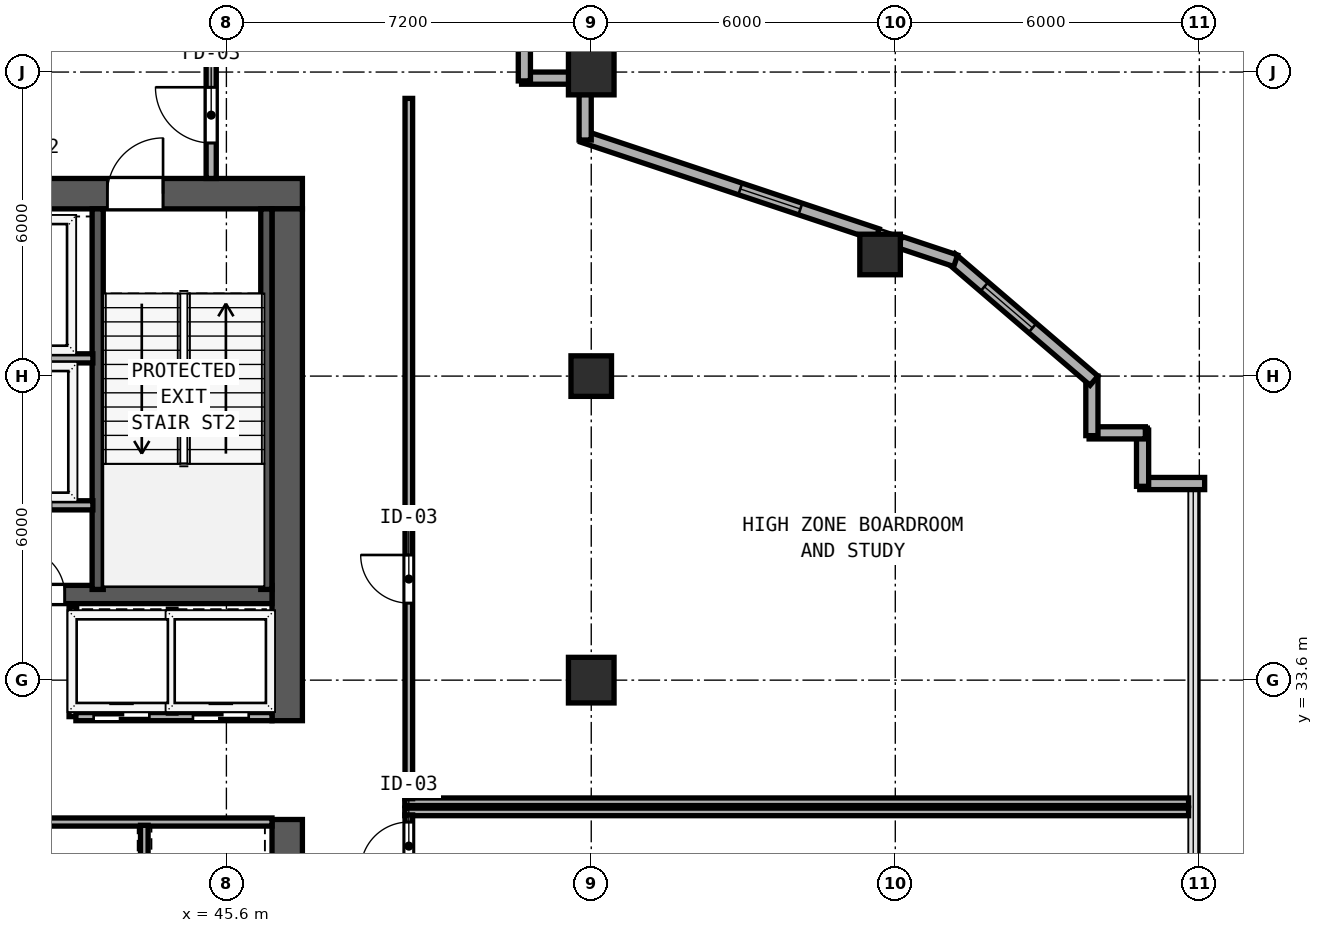
"""IFC4 building model, lengths in metres.
Left out: names, types, materials, properties, quantities, classifications, styles, units other than length and angle.
Written with IfcOpenShell. Run it as: python <this file> out.ifc"""

import sys

from ifc_helpers import new_model, si_unit, direction, frame, frame_2d, origin, origin_2d, place, context, subcontext, project, spatial, rectangle, hollow_rectangle, extrude, element, fill, save


model = new_model("IFC4")
c1 = context("Model", 3, precision=1e-05, world=origin(), true_north=direction((0.0, 1.0)))
c2 = subcontext(c1, "Body", "Model", "MODEL_VIEW")
j1 = project(units=[si_unit("LENGTHUNIT", "METRE"), si_unit("PLANEANGLEUNIT", "RADIAN")], contexts=[c1])
p1 = place(None, origin())
s1 = spatial("IfcSite", under=j1, at=p1, CompositionType="ELEMENT")
p2 = place(p1, origin())
s2 = spatial("IfcBuilding", under=s1, at=p2, CompositionType="ELEMENT")
p3 = place(p2, frame((0.0, 0.0, 164.6)))
s3 = spatial("IfcBuildingStorey", under=s2, at=p3, CompositionType="ELEMENT", Elevation=164.6)
p4 = place(p3, frame((29.7, 43.2, 0.0), z_axis=(0.0, 0.0, 1.0), x_axis=(1.0, 0.0, 0.0)))
e1 = element("IfcWall", 1, at=p4, inside=s3, PredefinedType="SHEAR", context=c2, shape_type="SweptSolid", body=[
    extrude(rectangle(XDim=17.4, YDim=0.6, at=frame_2d((8.7, 0.0))), origin(), (0.0, 0.0, 1.0), 4.22),
])
p5 = place(p4, frame((2.35, 0.0, 0.0)))
e2 = element("IfcOpeningElement", 2, at=p5, cuts=e1, PredefinedType="OPENING", context=c2, shape_type="SweptSolid", body=[
    extrude(rectangle(XDim=1.1, YDim=2.15, at=frame_2d((0.55, 1.075))), frame((0.0, 0.31, 0.0), z_axis=(0.0, -1.0, 0.0), x_axis=(1.0, 0.0, 0.0)), (0.0, 0.0, 1.0), 0.62),
])
p6 = place(p4, frame((7.46, 0.0, 0.0)))
e3 = element("IfcOpeningElement", 3, at=p6, cuts=e1, PredefinedType="OPENING", context=c2, shape_type="SweptSolid", body=[
    extrude(rectangle(XDim=1.1, YDim=2.15, at=frame_2d((0.55, 1.075))), frame((0.0, 0.31, 0.0), z_axis=(0.0, -1.0, 0.0), x_axis=(1.0, 0.0, 0.0)), (0.0, 0.0, 1.0), 0.62),
])
p7 = place(p4, frame((13.55, 0.0, 0.0)))
e4 = element("IfcOpeningElement", 4, at=p7, cuts=e1, PredefinedType="OPENING", context=c2, shape_type="SweptSolid", body=[
    extrude(rectangle(XDim=1.1, YDim=2.15, at=frame_2d((0.55, 1.075))), frame((0.0, 0.31, 0.0), z_axis=(0.0, -1.0, 0.0), x_axis=(1.0, 0.0, 0.0)), (0.0, 0.0, 1.0), 0.62),
])
p8 = place(p4, frame((4.68, 0.0, 0.0)))
e5 = element("IfcOpeningElement", 5, at=p8, cuts=e1, PredefinedType="OPENING", context=c2, shape_type="SweptSolid", body=[
    extrude(rectangle(XDim=1.1, YDim=2.2, at=frame_2d((0.55, 1.1))), frame((0.0, 0.31, 0.0), z_axis=(0.0, -1.0, 0.0), x_axis=(1.0, 0.0, 0.0)), (0.0, 0.0, 1.0), 0.62),
])
p9 = place(p4, frame((11.04, 0.0, 0.0)))
e6 = element("IfcOpeningElement", 6, at=p9, cuts=e1, PredefinedType="OPENING", context=c2, shape_type="SweptSolid", body=[
    extrude(rectangle(XDim=1.1, YDim=2.2, at=frame_2d((0.55, 1.1))), frame((0.0, 0.31, 0.0), z_axis=(0.0, -1.0, 0.0), x_axis=(1.0, 0.0, 0.0)), (0.0, 0.0, 1.0), 0.62),
])
p10 = place(p3, frame((46.8, 26.7, 0.0), z_axis=(0.0, 0.0, 1.0), x_axis=(0.0, 1.0, 0.0)))
e7 = element("IfcWall", 7, at=p10, inside=s3, PredefinedType="SHEAR", context=c2, shape_type="SweptSolid", body=[
    extrude(rectangle(XDim=4.15, YDim=0.6, at=frame_2d((2.075, 0.0))), origin(), (0.0, 0.0, 1.0), 4.22),
])
p11 = place(p3, frame((46.8, 32.8, 0.0), z_axis=(0.0, 0.0, 1.0), x_axis=(0.0, 1.0, 0.0)))
e8 = element("IfcWall", 8, at=p11, inside=s3, PredefinedType="SHEAR", context=c2, shape_type="SweptSolid", body=[
    extrude(rectangle(XDim=10.1, YDim=0.6, at=frame_2d((5.05, 0.0))), origin(), (0.0, 0.0, 1.0), 4.22),
])
p12 = place(p3, frame((30.3, 35.29, 0.0), z_axis=(0.0, 0.0, 1.0), x_axis=(1.0, 0.0, 0.0)))
e9 = element("IfcWall", 9, at=p12, inside=s3, PredefinedType="SHEAR", context=c2, shape_type="SweptSolid", body=[
    extrude(rectangle(XDim=16.2, YDim=0.36, at=frame_2d((8.1, 0.0))), origin(), (0.0, 0.0, 1.0), 4.22),
])
p13 = place(p12, frame((5.05, 0.0, 0.0), z_axis=(0.0, 0.0, 1.0), x_axis=(-1.0, 0.0, 0.0)))
e10 = element("IfcOpeningElement", 10, at=p13, cuts=e9, PredefinedType="OPENING", context=c2, shape_type="SweptSolid", body=[
    extrude(rectangle(XDim=0.9, YDim=2.1, at=frame_2d((0.45, 1.05))), frame((0.0, 0.19, 0.0), z_axis=(0.0, -1.0, 0.0), x_axis=(1.0, 0.0, 0.0)), (0.0, 0.0, 1.0), 0.38),
])
p14 = place(p12, frame((12.11, 0.0, 0.0), z_axis=(0.0, 0.0, 1.0), x_axis=(-1.0, 0.0, 0.0)))
e11 = element("IfcOpeningElement", 11, at=p14, cuts=e9, PredefinedType="OPENING", context=c2, shape_type="SweptSolid", body=[
    extrude(rectangle(XDim=0.9, YDim=2.1, at=frame_2d((0.45, 1.05))), frame((0.0, 0.19, 0.0), z_axis=(0.0, -1.0, 0.0), x_axis=(1.0, 0.0, 0.0)), (0.0, 0.0, 1.0), 0.38),
])
for number, where, z_axis, x_axis in (
    (12, (43.06, 35.39, 0.0), (0.0, 0.0, 1.0), (0.0, 1.0, 0.0)),
    (13, (46.388, 35.39, 0.0), (0.0, 0.0, 1.0), (0.0, 1.0, 0.0)),
):
    element("IfcWall", number, at=place(p3, frame(where, z_axis=z_axis, x_axis=x_axis)), inside=s3, PredefinedType="SHEAR", context=c2, shape_type="SweptSolid", body=[
        extrude(rectangle(XDim=7.51, YDim=0.22, at=frame_2d((3.755, 0.0))), origin(), (0.0, 0.0, 1.0), 4.22),
    ])
for number, where, z_axis, x_axis in (
    (14, (52.8, 33.6, 0.0), (0.0, 0.0, 1.0), (1.0, 0.0, 0.0)),
    (15, (52.8, 45.6, 0.0), (0.0, 0.0, 1.0), (1.0, 0.0, 0.0)),
):
    element("IfcColumn", number, at=place(p3, frame(where, z_axis=z_axis, x_axis=x_axis)), inside=s3, PredefinedType="COLUMN", context=c2, shape_type="SweptSolid", body=[
        extrude(hollow_rectangle(XDim=0.9, YDim=0.9, WallThickness=0.034, at=origin_2d()), origin(), (0.0, 0.0, 1.0), 4.4),
    ])
for number, where, z_axis, x_axis in (
    (16, (52.8, 39.6, 0.0), (0.0, 0.0, 1.0), (1.0, 0.0, 0.0)),
    (17, (58.5, 42.0, 0.0), (0.0, 0.0, 1.0), (1.0, 0.0, 0.0)),
):
    element("IfcColumn", number, at=place(p3, frame(where, z_axis=z_axis, x_axis=x_axis)), inside=s3, PredefinedType="COLUMN", context=c2, shape_type="SweptSolid", body=[
        extrude(hollow_rectangle(XDim=0.8, YDim=0.8, WallThickness=0.03, at=origin_2d()), origin(), (0.0, 0.0, 1.0), 4.4),
    ])
p15 = place(p3, frame((64.905, 37.48, 0.0), z_axis=(0.0, 0.0, 1.0), x_axis=(-1.0, 0.0, 0.0)))
e18 = element("IfcWall", 18, at=p15, inside=s3, PredefinedType="SOLIDWALL", context=c2, shape_type="SweptSolid", body=[
    extrude(rectangle(XDim=1.28, YDim=0.24, at=frame_2d((0.64, 0.0))), origin(), (0.0, 0.0, 1.0), 4.22),
])
p16 = place(p3, frame((63.68, 37.425, 0.0), z_axis=(0.0, 0.0, 1.0), x_axis=(0.0, 1.0, 0.0)))
e19 = element("IfcWall", 19, at=p16, inside=s3, PredefinedType="SOLIDWALL", context=c2, shape_type="SweptSolid", body=[
    extrude(rectangle(XDim=1.11, YDim=0.24, at=frame_2d((0.555, 0.0))), origin(), (0.0, 0.0, 1.0), 4.22),
])
p17 = place(p3, frame((63.735, 38.48, 0.0), z_axis=(0.0, 0.0, 1.0), x_axis=(-1.0, 0.0, 0.0)))
e20 = element("IfcWall", 20, at=p17, inside=s3, PredefinedType="SOLIDWALL", context=c2, shape_type="SweptSolid", body=[
    extrude(rectangle(XDim=1.11, YDim=0.24, at=frame_2d((0.555, 0.0))), origin(), (0.0, 0.0, 1.0), 4.22),
])
p18 = place(p3, frame((62.68, 38.425, 0.0), z_axis=(0.0, 0.0, 1.0), x_axis=(0.0, 1.0, 0.0)))
e21 = element("IfcWall", 21, at=p18, inside=s3, PredefinedType="SOLIDWALL", context=c2, shape_type="SweptSolid", body=[
    extrude(rectangle(XDim=1.175, YDim=0.24, at=frame_2d((0.587, 0.0))), origin(), (0.0, 0.0, 1.0), 4.22),
])
p19 = place(p3, frame((62.722, 39.509, 0.0), z_axis=(0.0, 0.0, 1.0), x_axis=(-0.759247334792, 0.650802185469, 0.0)))
e22 = element("IfcWall", 22, at=p19, inside=s3, PredefinedType="SOLIDWALL", context=c2, shape_type="SweptSolid", body=[
    extrude(rectangle(XDim=3.719, YDim=0.24, at=frame_2d((1.86, 0.0))), origin(), (0.0, 0.0, 1.0), 4.22),
])
p20 = place(p19, frame((1.6, 0.0, 0.85)))
e23 = element("IfcOpeningElement", 23, at=p20, cuts=e22, PredefinedType="OPENING", context=c2, shape_type="SweptSolid", body=[
    extrude(rectangle(XDim=1.25, YDim=1.95, at=frame_2d((0.625, 0.975))), frame((0.0, 0.13, 0.0), z_axis=(0.0, -1.0, 0.0), x_axis=(1.0, 0.0, 0.0)), (0.0, 0.0, 1.0), 0.26),
])
p21 = place(p3, frame((59.992, 41.876, 0.0), z_axis=(0.0, 0.0, 1.0), x_axis=(-0.948662237962, 0.316290939272, 0.0)))
e24 = element("IfcWall", 24, at=p21, inside=s3, PredefinedType="SOLIDWALL", context=c2, shape_type="SweptSolid", body=[
    extrude(rectangle(XDim=1.159, YDim=0.24, at=frame_2d((0.58, 0.0))), origin(), (0.0, 0.0, 1.0), 4.22),
])
p22 = place(p3, frame((58.445, 42.392, 0.0), z_axis=(0.0, 0.0, 1.0), x_axis=(-0.948695242668, 0.316191929909, 0.0)))
e25 = element("IfcWall", 25, at=p22, inside=s3, PredefinedType="SOLIDWALL", context=c2, shape_type="SweptSolid", body=[
    extrude(rectangle(XDim=6.131, YDim=0.24, at=frame_2d((3.066, 0.0))), origin(), (0.0, 0.0, 1.0), 3.815),
])
p23 = place(p22, frame((1.6, 0.0, 0.85)))
e26 = element("IfcOpeningElement", 26, at=p23, cuts=e25, PredefinedType="OPENING", context=c2, shape_type="SweptSolid", body=[
    extrude(rectangle(XDim=1.25, YDim=1.95, at=frame_2d((0.625, 0.975))), frame((0.0, 0.13, 0.0), z_axis=(0.0, -1.0, 0.0), x_axis=(1.0, 0.0, 0.0)), (0.0, 0.0, 1.0), 0.26),
])
p24 = place(p3, frame((52.68, 44.259, 0.0), z_axis=(0.0, 0.0, 1.0), x_axis=(0.0, 1.0, 0.0)))
e27 = element("IfcWall", 27, at=p24, inside=s3, PredefinedType="SOLIDWALL", context=c2, shape_type="SweptSolid", body=[
    extrude(rectangle(XDim=0.899, YDim=0.24, at=frame_2d((0.45, 0.0))), origin(), (0.0, 0.0, 1.0), 3.815),
])
p25 = place(p3, frame((52.358, 45.48, 0.0), z_axis=(0.0, 0.0, 1.0), x_axis=(-1.0, 0.0, 0.0)))
e28 = element("IfcWall", 28, at=p25, inside=s3, PredefinedType="SOLIDWALL", context=c2, shape_type="SweptSolid", body=[
    extrude(rectangle(XDim=0.933, YDim=0.24, at=frame_2d((0.466, 0.0))), origin(), (0.0, 0.0, 1.0), 4.22),
])
p26 = place(p3, frame((51.48, 45.425, 0.0), z_axis=(0.0, 0.0, 1.0), x_axis=(0.0, 1.0, 0.0)))
e29 = element("IfcWall", 29, at=p26, inside=s3, PredefinedType="SOLIDWALL", context=c2, shape_type="SweptSolid", body=[
    extrude(rectangle(XDim=1.31, YDim=0.24, at=frame_2d((0.655, 0.0))), origin(), (0.0, 0.0, 1.0), 4.22),
])
p27 = place(p3, frame((45.3, 43.5, 0.0), z_axis=(0.0, 0.0, 1.0), x_axis=(0.0, 1.0, 0.0)))
e30 = element("IfcWall", 30, at=p27, inside=s3, PredefinedType="SOLIDWALL", context=c2, shape_type="SweptSolid", body=[
    extrude(rectangle(XDim=2.935, YDim=0.2, at=frame_2d((1.468, 0.0))), origin(), (0.0, 0.0, 1.0), 4.22),
])
p28 = place(p27, frame((0.7, 0.0, 0.0)))
e31 = element("IfcOpeningElement", 31, at=p28, cuts=e30, PredefinedType="OPENING", context=c2, shape_type="SweptSolid", body=[
    extrude(rectangle(XDim=1.1, YDim=2.15, at=frame_2d((0.55, 1.075))), frame((0.0, 0.11, 0.0), z_axis=(0.0, -1.0, 0.0), x_axis=(1.0, 0.0, 0.0)), (0.0, 0.0, 1.0), 0.22),
])
p29 = place(p3, frame((40.195, 39.95, 0.0), z_axis=(0.0, 0.0, 1.0), x_axis=(1.0, 0.0, 0.0)))
e32 = element("IfcWall", 32, at=p29, inside=s3, PredefinedType="SOLIDWALL", context=c2, shape_type="SweptSolid", body=[
    extrude(rectangle(XDim=2.77, YDim=0.18, at=frame_2d((1.385, 0.0))), origin(), (0.0, 0.0, 1.0), 4.22),
])
p30 = place(p3, frame((40.195, 37.05, 0.0), z_axis=(0.0, 0.0, 1.0), x_axis=(1.0, 0.0, 0.0)))
e33 = element("IfcWall", 33, at=p30, inside=s3, PredefinedType="SOLIDWALL", context=c2, shape_type="SweptSolid", body=[
    extrude(rectangle(XDim=2.77, YDim=0.18, at=frame_2d((1.385, 0.0))), origin(), (0.0, 0.0, 1.0), 4.22),
])
p31 = place(p30, frame((1.945, 0.0, 0.0), z_axis=(0.0, 0.0, 1.0), x_axis=(-1.0, 0.0, 0.0)))
e34 = element("IfcOpeningElement", 34, at=p31, cuts=e33, PredefinedType="OPENING", context=c2, shape_type="SweptSolid", body=[
    extrude(rectangle(XDim=1.2, YDim=2.2, at=frame_2d((0.6, 1.1))), frame((0.0, 0.1, 0.0), z_axis=(0.0, -1.0, 0.0), x_axis=(1.0, 0.0, 0.0)), (0.0, 0.0, 1.0), 0.2),
])
p32 = place(p3, frame((42.57, 32.88, 0.0), z_axis=(0.0, 0.0, 1.0), x_axis=(0.0, 1.0, 0.0)))
e35 = element("IfcWall", 35, at=p32, inside=s3, PredefinedType="SOLIDWALL", context=c2, shape_type="SweptSolid", body=[
    extrude(rectangle(XDim=2.17, YDim=0.15, at=frame_2d((1.085, 0.0))), origin(), (0.0, 0.0, 1.0), 4.22),
])
p33 = place(p3, frame((42.63, 32.88, 0.0), z_axis=(0.0, 0.0, 1.0), x_axis=(1.0, 0.0, 0.0)))
e36 = element("IfcWall", 36, at=p33, inside=s3, PredefinedType="SOLIDWALL", context=c2, shape_type="SweptSolid", body=[
    extrude(rectangle(XDim=3.87, YDim=0.16, at=frame_2d((1.935, 0.0))), origin(), (0.0, 0.0, 1.0), 4.22),
])
p34 = place(p33, frame((1.45, 0.0, 0.0), z_axis=(0.0, 0.0, 1.0), x_axis=(-1.0, 0.0, 0.0)))
e37 = element("IfcOpeningElement", 37, at=p34, cuts=e36, PredefinedType="OPENING", context=c2, shape_type="SweptSolid", body=[
    extrude(rectangle(XDim=1.1, YDim=2.2, at=frame_2d((0.55, 1.1))), frame((0.0, 0.09, 0.0), z_axis=(0.0, -1.0, 0.0), x_axis=(1.0, 0.0, 0.0)), (0.0, 0.0, 1.0), 0.18),
])
p35 = place(p33, frame((3.41, 0.0, 0.0), z_axis=(0.0, 0.0, 1.0), x_axis=(-1.0, 0.0, 0.0)))
e38 = element("IfcOpeningElement", 38, at=p35, cuts=e36, PredefinedType="OPENING", context=c2, shape_type="SweptSolid", body=[
    extrude(rectangle(XDim=1.1, YDim=2.2, at=frame_2d((0.55, 1.1))), frame((0.0, 0.09, 0.0), z_axis=(0.0, -1.0, 0.0), x_axis=(1.0, 0.0, 0.0)), (0.0, 0.0, 1.0), 0.18),
])
p36 = place(p3, frame((44.53, 32.95, 0.0), z_axis=(0.0, 0.0, 1.0), x_axis=(0.0, 1.0, 0.0)))
e39 = element("IfcWall", 39, at=p36, inside=s3, PredefinedType="SOLIDWALL", context=c2, shape_type="SweptSolid", body=[
    extrude(rectangle(XDim=2.05, YDim=0.15, at=frame_2d((1.025, 0.0))), origin(), (0.0, 0.0, 1.0), 4.22),
])
p37 = place(p3, frame((30.3, 30.8, 0.0), z_axis=(0.0, 0.0, 1.0), x_axis=(1.0, 0.0, 0.0)))
e40 = element("IfcWall", 40, at=p37, inside=s3, PredefinedType="SOLIDWALL", context=c2, shape_type="SweptSolid", body=[
    extrude(rectangle(XDim=16.2, YDim=0.16, at=frame_2d((8.1, 0.0))), origin(), (0.0, 0.0, 1.0), 4.22),
])
p38 = place(p37, frame((0.52, 0.0, 0.0)))
e41 = element("IfcOpeningElement", 41, at=p38, cuts=e40, PredefinedType="OPENING", context=c2, shape_type="SweptSolid", body=[
    extrude(rectangle(XDim=1.1, YDim=2.2, at=frame_2d((0.55, 1.1))), frame((0.0, 0.09, 0.0), z_axis=(0.0, -1.0, 0.0), x_axis=(1.0, 0.0, 0.0)), (0.0, 0.0, 1.0), 0.18),
])
p39 = place(p37, frame((2.58, 0.0, 0.0)))
e42 = element("IfcOpeningElement", 42, at=p39, cuts=e40, PredefinedType="OPENING", context=c2, shape_type="SweptSolid", body=[
    extrude(rectangle(XDim=1.1, YDim=2.2, at=frame_2d((0.55, 1.1))), frame((0.0, 0.09, 0.0), z_axis=(0.0, -1.0, 0.0), x_axis=(1.0, 0.0, 0.0)), (0.0, 0.0, 1.0), 0.18),
])
p40 = place(p37, frame((4.64, 0.0, 0.0)))
e43 = element("IfcOpeningElement", 43, at=p40, cuts=e40, PredefinedType="OPENING", context=c2, shape_type="SweptSolid", body=[
    extrude(rectangle(XDim=1.1, YDim=2.2, at=frame_2d((0.55, 1.1))), frame((0.0, 0.09, 0.0), z_axis=(0.0, -1.0, 0.0), x_axis=(1.0, 0.0, 0.0)), (0.0, 0.0, 1.0), 0.18),
])
p41 = place(p37, frame((6.7, 0.0, 0.0)))
e44 = element("IfcOpeningElement", 44, at=p41, cuts=e40, PredefinedType="OPENING", context=c2, shape_type="SweptSolid", body=[
    extrude(rectangle(XDim=1.1, YDim=2.2, at=frame_2d((0.55, 1.1))), frame((0.0, 0.09, 0.0), z_axis=(0.0, -1.0, 0.0), x_axis=(1.0, 0.0, 0.0)), (0.0, 0.0, 1.0), 0.18),
])
p42 = place(p3, frame((43.98, 28.75, 0.0), z_axis=(0.0, 0.0, 1.0), x_axis=(0.0, 1.0, 0.0)))
e45 = element("IfcWall", 45, at=p42, inside=s3, PredefinedType="SOLIDWALL", context=c2, shape_type="SweptSolid", body=[
    extrude(rectangle(XDim=1.985, YDim=0.15, at=frame_2d((0.993, 0.0))), origin(), (0.0, 0.0, 1.0), 4.22),
])
p43 = place(p3, frame((49.12, 31.0, 0.0), z_axis=(0.0, 0.0, 1.0), x_axis=(1.0, 0.0, 0.0)))
e46 = element("IfcWall", 46, at=p43, inside=s3, PredefinedType="PARTITIONING", context=c2, shape_type="SweptSolid", body=[
    extrude(rectangle(XDim=15.468, YDim=0.15, at=frame_2d((7.734, 0.0))), origin(), (0.0, 0.0, 1.0), 4.22),
])
p44 = place(p3, frame((49.2, 24.36, 0.0), z_axis=(0.0, 0.0, 1.0), x_axis=(0.0, 1.0, 0.0)))
e47 = element("IfcWall", 47, at=p44, inside=s3, PredefinedType="PARTITIONING", context=c2, shape_type="SweptSolid", body=[
    extrude(rectangle(XDim=6.58, YDim=0.15, at=frame_2d((3.29, 0.0))), origin(), (0.0, 0.0, 1.0), 4.22),
])
p45 = place(p44, frame((5.49, 0.0, 0.0)))
e48 = element("IfcOpeningElement", 48, at=p45, cuts=e47, PredefinedType="OPENING", context=c2, shape_type="SweptSolid", body=[
    extrude(rectangle(XDim=0.95, YDim=2.12, at=frame_2d((0.475, 1.06))), frame((0.0, 0.085, 0.0), z_axis=(0.0, -1.0, 0.0), x_axis=(1.0, 0.0, 0.0)), (0.0, 0.0, 1.0), 0.17),
])
p46 = place(p3, frame((49.12, 31.2, 0.0), z_axis=(0.0, 0.0, 1.0), x_axis=(1.0, 0.0, 0.0)))
e49 = element("IfcWall", 49, at=p46, inside=s3, PredefinedType="PARTITIONING", context=c2, shape_type="SweptSolid", body=[
    extrude(rectangle(XDim=15.468, YDim=0.15, at=frame_2d((7.734, 0.0))), origin(), (0.0, 0.0, 1.0), 4.22),
])
p47 = place(p3, frame((49.2, 31.26, 0.0), z_axis=(0.0, 0.0, 1.0), x_axis=(0.0, 1.0, 0.0)))
e50 = element("IfcWall", 50, at=p47, inside=s3, PredefinedType="PARTITIONING", context=c2, shape_type="SweptSolid", body=[
    extrude(rectangle(XDim=13.82, YDim=0.15, at=frame_2d((6.91, 0.0))), origin(), (0.0, 0.0, 1.0), 4.22),
])
p48 = place(p47, frame((3.86, 0.0, 0.0)))
e51 = element("IfcOpeningElement", 51, at=p48, cuts=e50, PredefinedType="OPENING", context=c2, shape_type="SweptSolid", body=[
    extrude(rectangle(XDim=0.95, YDim=2.12, at=frame_2d((0.475, 1.06))), frame((0.0, 0.085, 0.0), z_axis=(0.0, -1.0, 0.0), x_axis=(1.0, 0.0, 0.0)), (0.0, 0.0, 1.0), 0.17),
])
p49 = place(p20, origin())
e52 = element("IfcWindow", 52, at=p49, inside=s3, PartitioningType="SINGLE_PANEL", PredefinedType="WINDOW", context=c2, shape_type="SweptSolid", body=[
    extrude(rectangle(XDim=1.25, YDim=1.95, at=frame_2d((0.625, 0.975))), frame((0.0, 0.03, 0.0), z_axis=(0.0, -1.0, 0.0), x_axis=(1.0, 0.0, 0.0)), (0.0, 0.0, 1.0), 0.06),
])
fill(e23, e52)
p50 = place(p23, origin())
e53 = element("IfcWindow", 53, at=p50, inside=s3, PartitioningType="SINGLE_PANEL", PredefinedType="WINDOW", context=c2, shape_type="SweptSolid", body=[
    extrude(rectangle(XDim=1.25, YDim=1.95, at=frame_2d((0.625, 0.975))), frame((0.0, 0.03, 0.0), z_axis=(0.0, -1.0, 0.0), x_axis=(1.0, 0.0, 0.0)), (0.0, 0.0, 1.0), 0.06),
])
fill(e26, e53)
p51 = place(p3, frame((0.0, 0.0, -0.25)))
p52 = place(p51, frame((56.0, 38.0, 0.0)))
p53 = place(p52, frame((0.0, 0.0, 0.2)))
e54 = element("IfcWindow", 54, at=p53, inside=s3, PartitioningType="SINGLE_PANEL", PredefinedType="SKYLIGHT", context=c2, shape_type="SweptSolid", body=[
    extrude(rectangle(XDim=1.6, YDim=1.6, at=origin_2d()), origin(), (0.0, 0.0, 1.0), 0.05),
])
p54 = place(p7, origin())
e55 = element("IfcDoor", 55, at=p54, inside=s3, OperationType="SINGLE_SWING_RIGHT", PredefinedType="DOOR", context=c2, shape_type="SweptSolid", body=[
    extrude(rectangle(XDim=1.1, YDim=2.15, at=frame_2d((0.55, 1.075))), frame((0.0, 0.185, 0.0), z_axis=(0.0, -1.0, 0.0), x_axis=(1.0, 0.0, 0.0)), (0.0, 0.0, 1.0), 0.05),
])
fill(e4, e55)
p55 = place(p28, origin())
e56 = element("IfcDoor", 56, at=p55, inside=s3, OperationType="SINGLE_SWING_RIGHT", PredefinedType="DOOR", context=c2, shape_type="SweptSolid", body=[
    extrude(rectangle(XDim=1.1, YDim=2.15, at=frame_2d((0.55, 1.075))), frame((0.0, 0.025, 0.0), z_axis=(0.0, -1.0, 0.0), x_axis=(1.0, 0.0, 0.0)), (0.0, 0.0, 1.0), 0.05),
])
fill(e31, e56)
p56 = place(p14, origin())
e57 = element("IfcDoor", 57, at=p56, inside=s3, OperationType="SINGLE_SWING_RIGHT", PredefinedType="DOOR", context=c2, shape_type="SweptSolid", body=[
    extrude(rectangle(XDim=0.9, YDim=2.1, at=frame_2d((0.45, 1.05))), frame((0.0, 0.025, 0.0), z_axis=(0.0, -1.0, 0.0), x_axis=(1.0, 0.0, 0.0)), (0.0, 0.0, 1.0), 0.05),
])
fill(e11, e57)
p57 = place(p34, origin())
e58 = element("IfcDoor", 58, at=p57, inside=s3, OperationType="SLIDING_TO_RIGHT", PredefinedType="DOOR", context=c2, shape_type="SweptSolid", body=[
    extrude(rectangle(XDim=1.1, YDim=2.2, at=frame_2d((0.55, 1.1))), frame((0.0, 0.025, 0.0), z_axis=(0.0, -1.0, 0.0), x_axis=(1.0, 0.0, 0.0)), (0.0, 0.0, 1.0), 0.05),
])
fill(e37, e58)
p58 = place(p35, origin())
e59 = element("IfcDoor", 59, at=p58, inside=s3, OperationType="SLIDING_TO_RIGHT", PredefinedType="DOOR", context=c2, shape_type="SweptSolid", body=[
    extrude(rectangle(XDim=1.1, YDim=2.2, at=frame_2d((0.55, 1.1))), frame((0.0, 0.025, 0.0), z_axis=(0.0, -1.0, 0.0), x_axis=(1.0, 0.0, 0.0)), (0.0, 0.0, 1.0), 0.05),
])
fill(e38, e59)
p59 = place(p45, origin())
e60 = element("IfcDoor", 60, at=p59, inside=s3, OperationType="SINGLE_SWING_LEFT", PredefinedType="DOOR", context=c2, shape_type="SweptSolid", body=[
    extrude(rectangle(XDim=0.95, YDim=2.12, at=frame_2d((0.475, 1.06))), frame((0.0, 0.025, 0.0), z_axis=(0.0, -1.0, 0.0), x_axis=(1.0, 0.0, 0.0)), (0.0, 0.0, 1.0), 0.05),
])
fill(e48, e60)
p60 = place(p48, origin())
e61 = element("IfcDoor", 61, at=p60, inside=s3, OperationType="SINGLE_SWING_RIGHT", PredefinedType="DOOR", context=c2, shape_type="SweptSolid", body=[
    extrude(rectangle(XDim=0.95, YDim=2.12, at=frame_2d((0.475, 1.06))), frame((0.0, 0.025, 0.0), z_axis=(0.0, -1.0, 0.0), x_axis=(1.0, 0.0, 0.0)), (0.0, 0.0, 1.0), 0.05),
])
fill(e51, e61)
save(model, sys.argv[1])
